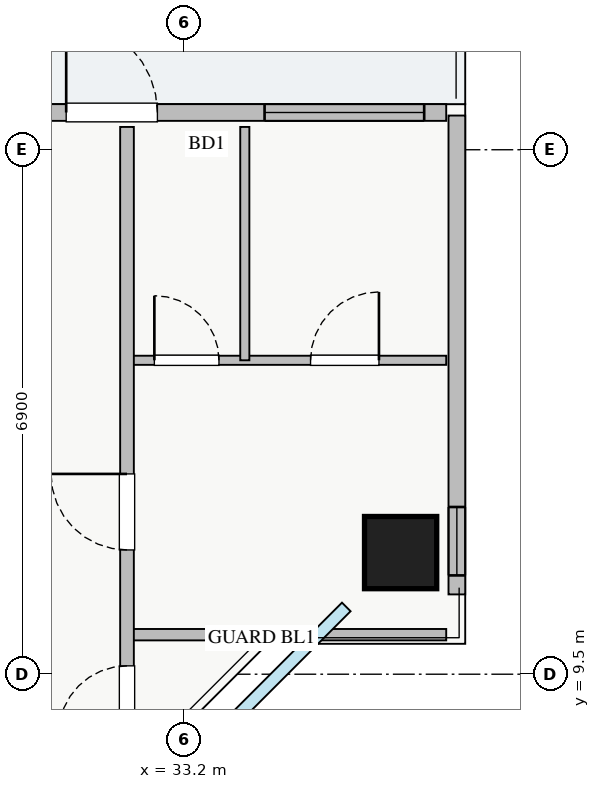
"""IFC4 building model, lengths in metres.
Left out: names, types, materials, properties, quantities, classifications, styles, units other than length and angle.
Written with IfcOpenShell. Run it as: python <this file> out.ifc"""

import sys

from ifc_helpers import new_model, si_unit, direction, frame, frame_2d, origin, origin_2d, place, context, subcontext, project, spatial, rectangle, extrude, source, transform, mapped, element, fill, save


model = new_model("IFC4")
c1 = context("Model", 3, precision=1e-05, world=origin(), true_north=direction((0.0, 1.0)))
c2 = subcontext(c1, "Body", "Model", "MODEL_VIEW")
j1 = project(units=[si_unit("LENGTHUNIT", "METRE"), si_unit("PLANEANGLEUNIT", "RADIAN")], contexts=[c1])
p1 = place(None, origin())
s1 = spatial("IfcSite", under=j1, at=p1, CompositionType="ELEMENT")
p2 = place(p1, origin())
s2 = spatial("IfcBuilding", under=s1, at=p2, CompositionType="ELEMENT")
p3 = place(p2, frame((0.0, 0.0, 153.5)))
s3 = spatial("IfcBuildingStorey", under=s2, at=p3, CompositionType="ELEMENT", Elevation=153.5)
m1 = source(origin(), c2, "Body", "SweptSolid", [
    extrude(rectangle(XDim=0.95, YDim=0.95, at=origin_2d()), origin(), (0.0, 0.0, 1.0), 3.25),
])
p4 = place(p3, frame((36.05, 11.1, 0.0), z_axis=(0.0, 0.0, 1.0), x_axis=(1.0, 0.0, 0.0)))
e1 = element("IfcColumn", 1, at=p4, inside=s3, PredefinedType="COLUMN", context=c2, shape_type="MappedRepresentation", body=[
    mapped(m1, transform((0.0, 0.0, 0.0), x_axis=(1.0, 0.0, 0.0), y_axis=(0.0, 1.0, 0.0), z_axis=(0.0, 0.0, 1.0), scale=1.0)),
])
p5 = place(p3, frame((27.78, 16.89, 0.0), z_axis=(0.0, 0.0, 1.0), x_axis=(1.0, 0.0, 0.0)))
e2 = element("IfcWall", 2, at=p5, inside=s3, PredefinedType="STANDARD", context=c2, shape_type="SweptSolid", body=[
    extrude(rectangle(XDim=8.87, YDim=0.22, at=frame_2d((4.435, 0.0))), origin(), (0.0, 0.0, 1.0), 2.61),
])
p6 = place(p5, frame((3.87, 0.0, 0.0)))
e3 = element("IfcOpeningElement", 3, at=p6, cuts=e2, PredefinedType="OPENING", context=c2, shape_type="SweptSolid", body=[
    extrude(rectangle(XDim=1.2, YDim=2.1, at=frame_2d((0.6, 1.05))), frame((0.0, 0.12, 0.0), z_axis=(0.0, -1.0, 0.0), x_axis=(1.0, 0.0, 0.0)), (0.0, 0.0, 1.0), 0.24),
])
p7 = place(p5, frame((1.22, 0.0, 0.9)))
e4 = element("IfcOpeningElement", 4, at=p7, cuts=e2, PredefinedType="OPENING", context=c2, shape_type="SweptSolid", body=[
    extrude(rectangle(XDim=2.1, YDim=1.48, at=frame_2d((1.05, 0.74))), frame((0.0, 0.12, 0.0), z_axis=(0.0, -1.0, 0.0), x_axis=(1.0, 0.0, 0.0)), (0.0, 0.0, 1.0), 0.24),
])
p8 = place(p5, frame((6.48, 0.0, 0.9)))
e5 = element("IfcOpeningElement", 5, at=p8, cuts=e2, PredefinedType="OPENING", context=c2, shape_type="SweptSolid", body=[
    extrude(rectangle(XDim=2.1, YDim=1.5, at=frame_2d((1.05, 0.75))), frame((0.0, 0.12, 0.0), z_axis=(0.0, -1.0, 0.0), x_axis=(1.0, 0.0, 0.0)), (0.0, 0.0, 1.0), 0.24),
])
p9 = place(p3, frame((36.79, 10.55, 0.0), z_axis=(0.0, 0.0, 1.0), x_axis=(0.0, 1.0, 0.0)))
e6 = element("IfcWall", 6, at=p9, inside=s3, PredefinedType="STANDARD", context=c2, shape_type="SweptSolid", body=[
    extrude(rectangle(XDim=6.3, YDim=0.22, at=frame_2d((3.15, 0.0))), origin(), (0.0, 0.0, 1.0), 2.61),
])
p10 = place(p9, frame((0.25, 0.0, 0.9)))
e7 = element("IfcOpeningElement", 7, at=p10, cuts=e6, PredefinedType="OPENING", context=c2, shape_type="SweptSolid", body=[
    extrude(rectangle(XDim=0.9, YDim=1.2, at=frame_2d((0.45, 0.6))), frame((0.0, 0.12, 0.0), z_axis=(0.0, -1.0, 0.0), x_axis=(1.0, 0.0, 0.0)), (0.0, 0.0, 1.0), 0.24),
])
p11 = place(p3, frame((32.45, 13.63, 0.0), z_axis=(0.0, 0.0, 1.0), x_axis=(1.0, 0.0, 0.0)))
e8 = element("IfcWall", 8, at=p11, inside=s3, PredefinedType="PLUMBINGWALL", context=c2, shape_type="SweptSolid", body=[
    extrude(rectangle(XDim=4.2, YDim=0.12, at=frame_2d((2.1, 0.0))), origin(), (0.0, 0.0, 1.0), 3.07),
])
p12 = place(p11, frame((0.36, 0.0, 0.0)))
e9 = element("IfcOpeningElement", 9, at=p12, cuts=e8, PredefinedType="OPENING", context=c2, shape_type="SweptSolid", body=[
    extrude(rectangle(XDim=0.85, YDim=2.05, at=frame_2d((0.425, 1.025))), frame((0.0, 0.07, 0.0), z_axis=(0.0, -1.0, 0.0), x_axis=(1.0, 0.0, 0.0)), (0.0, 0.0, 1.0), 0.14),
])
p13 = place(p11, frame((2.415, 0.0, 0.0)))
e10 = element("IfcOpeningElement", 10, at=p13, cuts=e8, PredefinedType="OPENING", context=c2, shape_type="SweptSolid", body=[
    extrude(rectangle(XDim=0.9, YDim=2.05, at=frame_2d((0.45, 1.025))), frame((0.0, 0.07, 0.0), z_axis=(0.0, -1.0, 0.0), x_axis=(1.0, 0.0, 0.0)), (0.0, 0.0, 1.0), 0.14),
])
p14 = place(p3, frame((34.0, 13.63, 0.0), z_axis=(0.0, 0.0, 1.0), x_axis=(0.0, 1.0, 0.0)))
e11 = element("IfcWall", 11, at=p14, inside=s3, PredefinedType="PLUMBINGWALL", context=c2, shape_type="SweptSolid", body=[
    extrude(rectangle(XDim=3.07, YDim=0.12, at=frame_2d((1.535, 0.0))), origin(), (0.0, 0.0, 1.0), 3.07),
])
p15 = place(p3, frame((32.45, 10.02, 0.0), z_axis=(0.0, 0.0, 1.0), x_axis=(1.0, 0.0, 0.0)))
e12 = element("IfcWall", 12, at=p15, inside=s3, PredefinedType="PARTITIONING", context=c2, shape_type="SweptSolid", body=[
    extrude(rectangle(XDim=4.2, YDim=0.15, at=frame_2d((2.1, 0.0))), origin(), (0.0, 0.0, 1.0), 3.07),
])
p16 = place(p3, frame((32.45, 5.35, 0.0), z_axis=(0.0, 0.0, 1.0), x_axis=(0.0, 1.0, 0.0)))
e13 = element("IfcWall", 13, at=p16, inside=s3, PredefinedType="PARTITIONING", context=c2, shape_type="SweptSolid", body=[
    extrude(rectangle(XDim=11.35, YDim=0.18, at=frame_2d((5.675, 0.0))), origin(), (0.0, 0.0, 1.0), 3.07),
])
p17 = place(p16, frame((3.36, 0.0, 0.0)))
e14 = element("IfcOpeningElement", 14, at=p17, cuts=e13, PredefinedType="OPENING", context=c2, shape_type="SweptSolid", body=[
    extrude(rectangle(XDim=0.9, YDim=2.05, at=frame_2d((0.45, 1.025))), frame((0.0, 0.1, 0.0), z_axis=(0.0, -1.0, 0.0), x_axis=(1.0, 0.0, 0.0)), (0.0, 0.0, 1.0), 0.2),
])
p18 = place(p16, frame((5.785, 0.0, 0.0)))
e15 = element("IfcOpeningElement", 15, at=p18, cuts=e13, PredefinedType="OPENING", context=c2, shape_type="SweptSolid", body=[
    extrude(rectangle(XDim=1.0, YDim=2.05, at=frame_2d((0.5, 1.025))), frame((0.0, 0.1, 0.0), z_axis=(0.0, -1.0, 0.0), x_axis=(1.0, 0.0, 0.0)), (0.0, 0.0, 1.0), 0.2),
])
m2 = source(origin(), c2, "Body", "SweptSolid", [
    extrude(rectangle(XDim=1.2, YDim=2.1, at=frame_2d((0.6, 1.05))), frame((0.0, 0.025, 0.0), z_axis=(0.0, -1.0, 0.0), x_axis=(1.0, 0.0, 0.0)), (0.0, 0.0, 1.0), 0.05),
])
p19 = place(p6, origin())
e16 = element("IfcDoor", 16, at=p19, inside=s3, OperationType="SINGLE_SWING_LEFT", PredefinedType="DOOR", context=c2, shape_type="MappedRepresentation", body=[
    mapped(m2, transform((0.0, 0.0, 0.0), x_axis=(1.0, 0.0, 0.0), y_axis=(0.0, 1.0, 0.0), z_axis=(0.0, 0.0, 1.0), scale=1.0)),
])
fill(e3, e16)
m3 = source(origin(), c2, "Body", "SweptSolid", [
    extrude(rectangle(XDim=2.1, YDim=1.5, at=frame_2d((1.05, 0.75))), frame((0.0, 0.03, 0.0), z_axis=(0.0, -1.0, 0.0), x_axis=(1.0, 0.0, 0.0)), (0.0, 0.0, 1.0), 0.06),
])
p20 = place(p8, origin())
e17 = element("IfcWindow", 17, at=p20, inside=s3, PartitioningType="TRIPLE_PANEL_VERTICAL", PredefinedType="WINDOW", context=c2, shape_type="MappedRepresentation", body=[
    mapped(m3, transform((0.0, 0.0, 0.0), x_axis=(1.0, 0.0, 0.0), y_axis=(0.0, 1.0, 0.0), z_axis=(0.0, 0.0, 1.0), scale=1.0)),
])
fill(e5, e17)
m4 = source(origin(), c2, "Body", "SweptSolid", [
    extrude(rectangle(XDim=0.85, YDim=2.05, at=frame_2d((0.425, 1.025))), frame((0.0, 0.025, 0.0), z_axis=(0.0, -1.0, 0.0), x_axis=(1.0, 0.0, 0.0)), (0.0, 0.0, 1.0), 0.05),
])
p21 = place(p12, origin())
e18 = element("IfcDoor", 18, at=p21, inside=s3, OperationType="SINGLE_SWING_LEFT", PredefinedType="DOOR", context=c2, shape_type="MappedRepresentation", body=[
    mapped(m4, transform((0.0, 0.0, 0.0), x_axis=(1.0, 0.0, 0.0), y_axis=(0.0, 1.0, 0.0), z_axis=(0.0, 0.0, 1.0), scale=1.0)),
])
fill(e9, e18)
m5 = source(origin(), c2, "Body", "SweptSolid", [
    extrude(rectangle(XDim=0.9, YDim=2.05, at=frame_2d((0.45, 1.025))), frame((0.0, 0.025, 0.0), z_axis=(0.0, -1.0, 0.0), x_axis=(1.0, 0.0, 0.0)), (0.0, 0.0, 1.0), 0.05),
])
p22 = place(p13, origin())
e19 = element("IfcDoor", 19, at=p22, inside=s3, OperationType="SINGLE_SWING_RIGHT", PredefinedType="DOOR", context=c2, shape_type="MappedRepresentation", body=[
    mapped(m5, transform((0.0, 0.0, 0.0), x_axis=(1.0, 0.0, 0.0), y_axis=(0.0, 1.0, 0.0), z_axis=(0.0, 0.0, 1.0), scale=1.0)),
])
fill(e10, e19)
p23 = place(p17, origin())
e20 = element("IfcDoor", 20, at=p23, inside=s3, OperationType="SINGLE_SWING_LEFT", PredefinedType="DOOR", context=c2, shape_type="MappedRepresentation", body=[
    mapped(m5, transform((0.0, 0.0, 0.0), x_axis=(1.0, 0.0, 0.0), y_axis=(0.0, 1.0, 0.0), z_axis=(0.0, 0.0, 1.0), scale=1.0)),
])
fill(e14, e20)
m6 = source(origin(), c2, "Body", "SweptSolid", [
    extrude(rectangle(XDim=1.0, YDim=2.05, at=frame_2d((0.5, 1.025))), frame((0.0, 0.025, 0.0), z_axis=(0.0, -1.0, 0.0), x_axis=(1.0, 0.0, 0.0)), (0.0, 0.0, 1.0), 0.05),
])
p24 = place(p18, origin())
e21 = element("IfcDoor", 21, at=p24, inside=s3, OperationType="SINGLE_SWING_RIGHT", PredefinedType="DOOR", context=c2, shape_type="MappedRepresentation", body=[
    mapped(m6, transform((0.0, 0.0, 0.0), x_axis=(1.0, 0.0, 0.0), y_axis=(0.0, 1.0, 0.0), z_axis=(0.0, 0.0, 1.0), scale=1.0)),
])
fill(e15, e21)
m7 = source(origin(), c2, "Body", "SweptSolid", [
    extrude(rectangle(XDim=0.9, YDim=1.2, at=frame_2d((0.45, 0.6))), frame((0.0, 0.03, 0.0), z_axis=(0.0, -1.0, 0.0), x_axis=(1.0, 0.0, 0.0)), (0.0, 0.0, 1.0), 0.06),
])
p25 = place(p10, origin())
e22 = element("IfcWindow", 22, at=p25, inside=s3, PartitioningType="SINGLE_PANEL", PredefinedType="WINDOW", context=c2, shape_type="MappedRepresentation", body=[
    mapped(m7, transform((0.0, 0.0, 0.0), x_axis=(1.0, 0.0, 0.0), y_axis=(0.0, 1.0, 0.0), z_axis=(0.0, 0.0, 1.0), scale=1.0)),
])
fill(e7, e22)
save(model, sys.argv[1])
